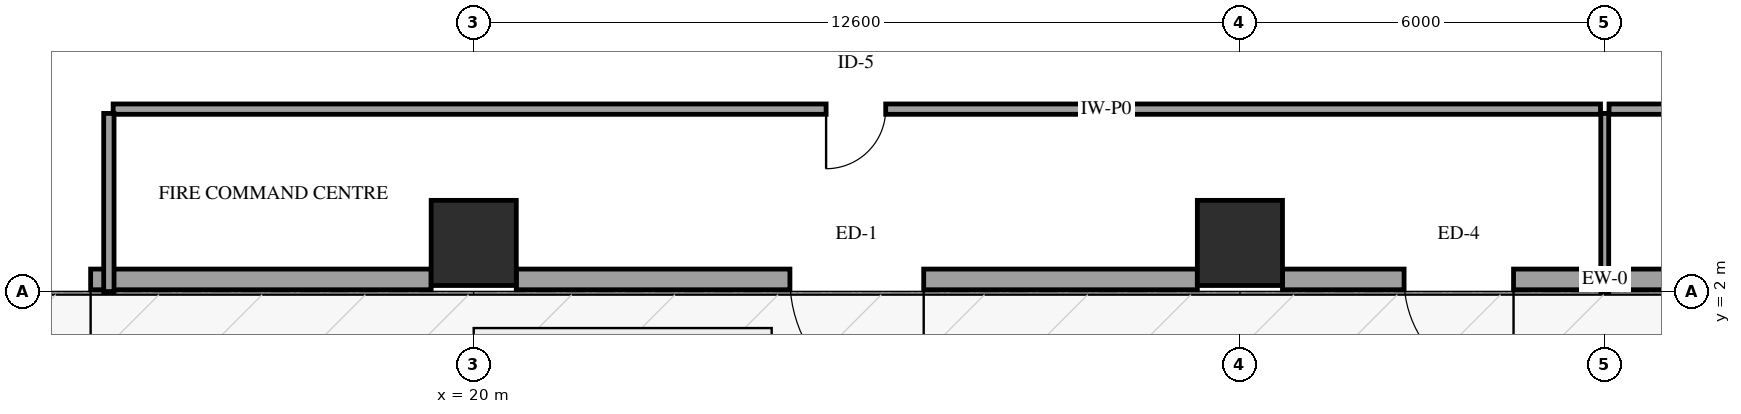
"""IFC4 building model, lengths in metres.
Left out: names, types, materials, properties, quantities, classifications, styles, units other than length and angle.
Written with IfcOpenShell. Run it as: python <this file> out.ifc"""

import sys

from ifc_helpers import new_model, si_unit, direction, frame, frame_2d, origin, origin_2d, place, context, subcontext, project, spatial, rectangle, extrude, element, fill, save


model = new_model("IFC4")
c1 = context("Model", 3, precision=1e-05, world=origin(), true_north=direction((0.0, 1.0)))
c2 = subcontext(c1, "Body", "Model", "MODEL_VIEW")
j1 = project(units=[si_unit("LENGTHUNIT", "METRE"), si_unit("PLANEANGLEUNIT", "RADIAN")], contexts=[c1])
p1 = place(None, origin())
s1 = spatial("IfcSite", under=j1, at=p1, CompositionType="ELEMENT")
p2 = place(p1, origin())
s2 = spatial("IfcBuilding", under=s1, at=p2, CompositionType="ELEMENT")
p3 = place(p2, origin())
s3 = spatial("IfcBuildingStorey", under=s2, at=p3, CompositionType="ELEMENT", Elevation=0.0)
for number, where, z_axis, x_axis in (
    (1, (20.0, 2.8, 0.0), (0.0, 0.0, 1.0), (1.0, 0.0, 0.0)),
    (2, (32.6, 2.8, 0.0), (0.0, 0.0, 1.0), (1.0, 0.0, 0.0)),
):
    element("IfcColumn", number, at=place(p3, frame(where, z_axis=z_axis, x_axis=x_axis)), inside=s3, PredefinedType="COLUMN", context=c2, shape_type="SweptSolid", body=[
        extrude(rectangle(XDim=1.4, YDim=1.4, at=origin_2d()), origin(), (0.0, 0.0, 1.0), 6.0),
    ])
p4 = place(p3, frame((19.3, 2.2, 0.0), z_axis=(0.0, 0.0, 1.0), x_axis=(-1.0, 0.0, 0.0)))
e3 = element("IfcWall", 3, at=p4, inside=s3, PredefinedType="SOLIDWALL", context=c2, shape_type="SweptSolid", body=[
    extrude(rectangle(XDim=17.8, YDim=0.34, at=frame_2d((8.9, 0.0))), origin(), (0.0, 0.0, 1.0), 4.736),
])
p5 = place(p4, frame((5.6, 0.0, 0.0)))
e4 = element("IfcOpeningElement", 4, at=p5, cuts=e3, PredefinedType="OPENING", context=c2, shape_type="SweptSolid", body=[
    extrude(rectangle(XDim=2.2, YDim=2.4, at=frame_2d((1.1, 1.2))), frame((0.0, 0.18, 0.0), z_axis=(0.0, -1.0, 0.0), x_axis=(1.0, 0.0, 0.0)), (0.0, 0.0, 1.0), 0.36),
])
p6 = place(p3, frame((31.9, 2.2, 0.0), z_axis=(0.0, 0.0, 1.0), x_axis=(-1.0, 0.0, 0.0)))
e5 = element("IfcWall", 5, at=p6, inside=s3, PredefinedType="SOLIDWALL", context=c2, shape_type="SweptSolid", body=[
    extrude(rectangle(XDim=11.2, YDim=0.34, at=frame_2d((5.6, 0.0))), origin(), (0.0, 0.0, 1.0), 2.64),
])
p7 = place(p6, frame((4.5, 0.0, 0.0)))
e6 = element("IfcOpeningElement", 6, at=p7, cuts=e5, PredefinedType="OPENING", context=c2, shape_type="SweptSolid", body=[
    extrude(rectangle(XDim=2.2, YDim=2.4, at=frame_2d((1.1, 1.2))), frame((0.0, 0.18, 0.0), z_axis=(0.0, -1.0, 0.0), x_axis=(1.0, 0.0, 0.0)), (0.0, 0.0, 1.0), 0.36),
])
p8 = place(p3, frame((43.9, 2.2, 0.0), z_axis=(0.0, 0.0, 1.0), x_axis=(-1.0, 0.0, 0.0)))
e7 = element("IfcWall", 7, at=p8, inside=s3, PredefinedType="SOLIDWALL", context=c2, shape_type="SweptSolid", body=[
    extrude(rectangle(XDim=10.6, YDim=0.34, at=frame_2d((5.3, 0.0))), origin(), (0.0, 0.0, 1.0), 2.64),
])
p9 = place(p8, frame((6.8, 0.0, 0.0)))
e8 = element("IfcOpeningElement", 8, at=p9, cuts=e7, PredefinedType="OPENING", context=c2, shape_type="SweptSolid", body=[
    extrude(rectangle(XDim=1.8, YDim=2.3, at=frame_2d((0.9, 1.15))), frame((0.0, 0.18, 0.0), z_axis=(0.0, -1.0, 0.0), x_axis=(1.0, 0.0, 0.0)), (0.0, 0.0, 1.0), 0.36),
])
p10 = place(p3, frame((38.53, 5.0, 0.0), z_axis=(0.0, 0.0, 1.0), x_axis=(-1.0, 0.0, 0.0)))
e9 = element("IfcWall", 9, at=p10, inside=s3, PredefinedType="PARTITIONING", context=c2, shape_type="SweptSolid", body=[
    extrude(rectangle(XDim=24.46, YDim=0.17, at=frame_2d((12.23, 0.0))), origin(), (0.0, 0.0, 1.0), 5.68),
])
p11 = place(p10, frame((11.755, 0.0, 0.0)))
e10 = element("IfcOpeningElement", 10, at=p11, cuts=e9, PredefinedType="OPENING", context=c2, shape_type="SweptSolid", body=[
    extrude(rectangle(XDim=0.98, YDim=2.15, at=frame_2d((0.49, 1.075))), frame((0.0, 0.095, 0.0), z_axis=(0.0, -1.0, 0.0), x_axis=(1.0, 0.0, 0.0)), (0.0, 0.0, 1.0), 0.19),
])
p12 = place(p3, frame((46.73, 5.0, 0.0), z_axis=(0.0, 0.0, 1.0), x_axis=(-1.0, 0.0, 0.0)))
e11 = element("IfcWall", 11, at=p12, inside=s3, PredefinedType="PARTITIONING", context=c2, shape_type="SweptSolid", body=[
    extrude(rectangle(XDim=8.06, YDim=0.17, at=frame_2d((4.03, 0.0))), origin(), (0.0, 0.0, 1.0), 5.68),
])
p13 = place(p3, frame((14.0, 4.93, 0.0), z_axis=(0.0, 0.0, 1.0), x_axis=(0.0, -1.0, 0.0)))
e12 = element("IfcWall", 12, at=p13, inside=s3, PredefinedType="PARTITIONING", context=c2, shape_type="SweptSolid", body=[
    extrude(rectangle(XDim=2.93, YDim=0.17, at=frame_2d((1.465, 0.0))), origin(), (0.0, 0.0, 1.0), 5.68),
])
p14 = place(p3, frame((38.6, 4.93, 0.0), z_axis=(0.0, 0.0, 1.0), x_axis=(0.0, -1.0, 0.0)))
e13 = element("IfcWall", 13, at=p14, inside=s3, PredefinedType="PARTITIONING", context=c2, shape_type="SweptSolid", body=[
    extrude(rectangle(XDim=2.93, YDim=0.13, at=frame_2d((1.465, 0.0))), origin(), (0.0, 0.0, 1.0), 5.68),
])
p15 = place(p5, origin())
e14 = element("IfcDoor", 14, at=p15, inside=s3, OperationType="SINGLE_SWING_LEFT", PredefinedType="DOOR", context=c2, shape_type="SweptSolid", body=[
    extrude(rectangle(XDim=2.2, YDim=2.4, at=frame_2d((1.1, 1.2))), frame((0.0, 0.025, 0.0), z_axis=(0.0, -1.0, 0.0), x_axis=(1.0, 0.0, 0.0)), (0.0, 0.0, 1.0), 0.05),
])
fill(e4, e14)
p16 = place(p7, origin())
e15 = element("IfcDoor", 15, at=p16, inside=s3, OperationType="SINGLE_SWING_LEFT", PredefinedType="DOOR", context=c2, shape_type="SweptSolid", body=[
    extrude(rectangle(XDim=2.2, YDim=2.4, at=frame_2d((1.1, 1.2))), frame((0.0, 0.025, 0.0), z_axis=(0.0, -1.0, 0.0), x_axis=(1.0, 0.0, 0.0)), (0.0, 0.0, 1.0), 0.05),
])
fill(e6, e15)
p17 = place(p9, origin())
e16 = element("IfcDoor", 16, at=p17, inside=s3, OperationType="SINGLE_SWING_LEFT", PredefinedType="DOOR", context=c2, shape_type="SweptSolid", body=[
    extrude(rectangle(XDim=1.8, YDim=2.3, at=frame_2d((0.9, 1.15))), frame((0.0, 0.025, 0.0), z_axis=(0.0, -1.0, 0.0), x_axis=(1.0, 0.0, 0.0)), (0.0, 0.0, 1.0), 0.05),
])
fill(e8, e16)
p18 = place(p11, origin())
e17 = element("IfcDoor", 17, at=p18, inside=s3, OperationType="SINGLE_SWING_RIGHT", PredefinedType="DOOR", context=c2, shape_type="SweptSolid", body=[
    extrude(rectangle(XDim=0.98, YDim=2.15, at=frame_2d((0.49, 1.075))), frame((0.0, 0.025, 0.0), z_axis=(0.0, -1.0, 0.0), x_axis=(1.0, 0.0, 0.0)), (0.0, 0.0, 1.0), 0.05),
])
fill(e10, e17)
save(model, sys.argv[1])
